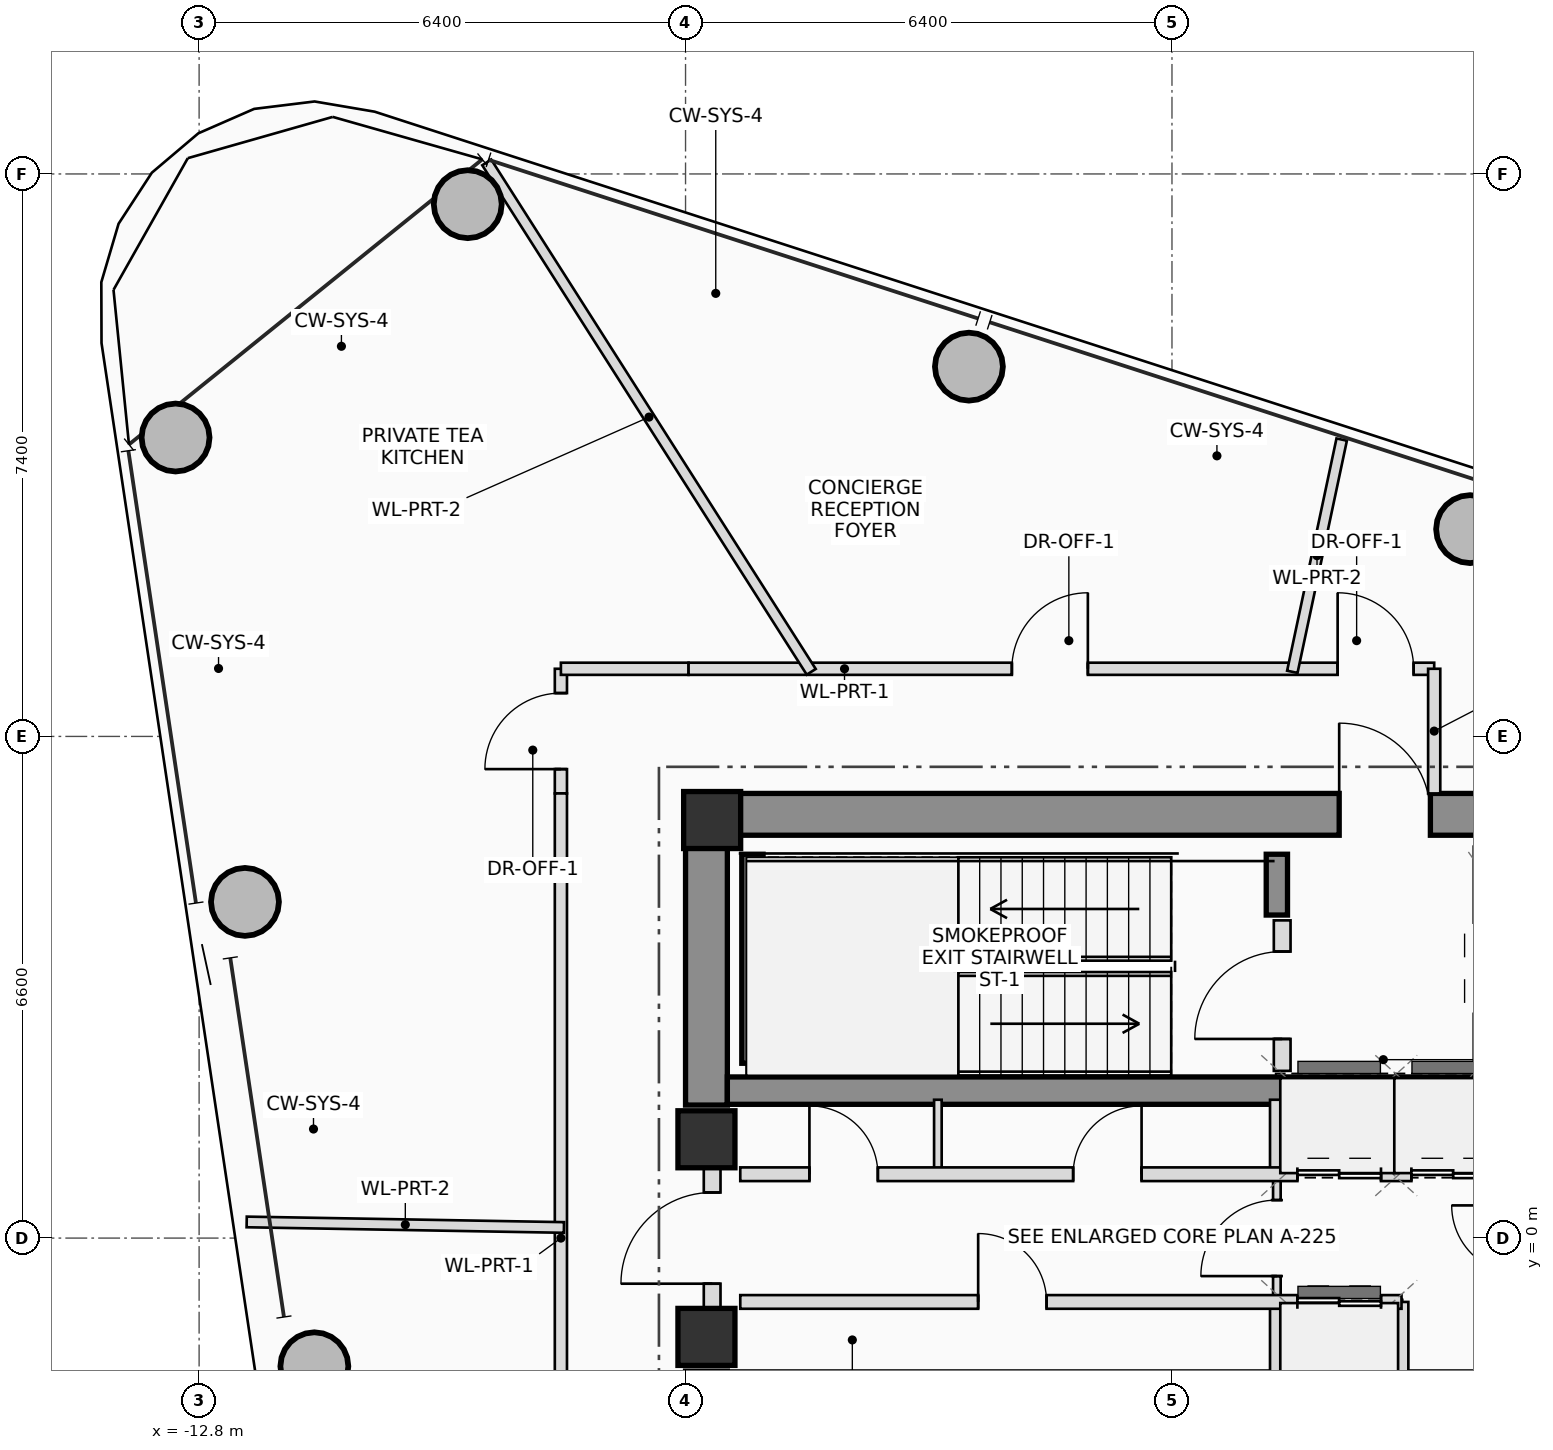
"""IFC4 building model, lengths in metres.
Left out: names, types, materials, properties, quantities, classifications, styles, units other than length and angle.
Written with IfcOpenShell. Run it as: python <this file> out.ifc"""

import sys

from ifc_helpers import new_model, si_unit, direction, frame, frame_2d, origin, origin_2d, place, context, subcontext, project, spatial, rectangle, hollow_circle, extrude, source, transform, mapped, element, fill, save


model = new_model("IFC4")
c1 = context("Model", 3, precision=1e-05, world=origin(), true_north=direction((0.0, 1.0)))
c2 = subcontext(c1, "Body", "Model", "MODEL_VIEW")
j1 = project(units=[si_unit("LENGTHUNIT", "METRE"), si_unit("PLANEANGLEUNIT", "RADIAN")], contexts=[c1])
p1 = place(None, origin())
s1 = spatial("IfcSite", under=j1, at=p1, CompositionType="ELEMENT")
p2 = place(p1, origin())
s2 = spatial("IfcBuilding", under=s1, at=p2, CompositionType="ELEMENT")
p3 = place(p2, frame((0.0, 0.0, 277.95)))
s3 = spatial("IfcBuildingStorey", under=s2, at=p3, CompositionType="ELEMENT", Elevation=277.95)
m1 = source(origin(), c2, "Body", "SweptSolid", [
    extrude(rectangle(XDim=0.75, YDim=0.75, at=origin_2d()), origin(), (0.0, 0.0, 1.0), 3.4),
])
p4 = place(p3, frame((-6.05, 5.5, 0.0), z_axis=(0.0, 0.0, 1.0), x_axis=(1.0, 0.0, 0.0)))
e1 = element("IfcColumn", 1, at=p4, inside=s3, PredefinedType="COLUMN", context=c2, shape_type="MappedRepresentation", body=[
    mapped(m1, transform((0.0, 0.0, 0.0), scale=1.0)),
])
p5 = place(p3, frame((-6.4, 5.575, 0.0), z_axis=(0.0, 0.0, 1.0), x_axis=(1.0, 0.0, 0.0)))
e2 = element("IfcWall", 2, at=p5, inside=s3, PredefinedType="SHEAR", context=c2, shape_type="SweptSolid", body=[
    extrude(rectangle(XDim=12.8, YDim=0.55, at=frame_2d((6.4, 0.0))), origin(), (0.0, 0.0, 1.0), 3.4),
])
p6 = place(p5, frame((8.6, 0.0, 0.0)))
e3 = element("IfcOpeningElement", 3, at=p6, cuts=e2, PredefinedType="OPENING", context=c2, shape_type="SweptSolid", body=[
    extrude(rectangle(XDim=1.2, YDim=2.2, at=frame_2d((0.6, 1.1))), frame((0.0, 0.285, 0.0), z_axis=(0.0, -1.0, 0.0), x_axis=(1.0, 0.0, 0.0)), (0.0, 0.0, 1.0), 0.57),
])
p7 = place(p3, frame((-6.125, 1.75, 0.0), z_axis=(0.0, 0.0, 1.0), x_axis=(0.0, 1.0, 0.0)))
e4 = element("IfcWall", 4, at=p7, inside=s3, PredefinedType="SHEAR", context=c2, shape_type="SweptSolid", body=[
    extrude(rectangle(XDim=3.55, YDim=0.55, at=frame_2d((1.775, 0.0))), origin(), (0.0, 0.0, 1.0), 3.4),
])
p8 = place(p3, frame((-5.85, 1.94, 0.0), z_axis=(0.0, 0.0, 1.0), x_axis=(1.0, 0.0, 0.0)))
e5 = element("IfcWall", 5, at=p8, inside=s3, PredefinedType="SHEAR", context=c2, shape_type="SweptSolid", body=[
    extrude(rectangle(XDim=11.7, YDim=0.36, at=frame_2d((5.85, 0.0))), origin(), (0.0, 0.0, 1.0), 3.4),
])
p9 = place(p3, frame((-5.52, 2.3, 0.0), z_axis=(0.0, 0.0, 1.0), x_axis=(0.0, 1.0, 0.0)))
e6 = element("IfcWall", 6, at=p9, inside=s3, PredefinedType="SHEAR", context=c2, shape_type="SweptSolid", body=[
    extrude(rectangle(XDim=2.75, YDim=0.28, at=frame_2d((1.375, 0.0))), origin(), (0.0, 0.0, 1.0), 3.4),
])
p10 = place(p3, frame((1.38, 4.25, 0.0), z_axis=(0.0, 0.0, 1.0), x_axis=(0.0, 1.0, 0.0)))
e7 = element("IfcWall", 7, at=p10, inside=s3, PredefinedType="SHEAR", context=c2, shape_type="SweptSolid", body=[
    extrude(rectangle(XDim=0.8, YDim=0.28, at=frame_2d((0.4, 0.0))), origin(), (0.0, 0.0, 1.0), 3.4),
])
for number, where, z_axis, x_axis in (
    (8, (-6.125, -1.3, 0.0), (0.0, 0.0, 1.0), (1.0, 0.0, 0.0)),
    (9, (-6.125, 1.3, 0.0), (0.0, 0.0, 1.0), (1.0, 0.0, 0.0)),
):
    element("IfcColumn", number, at=place(p3, frame(where, z_axis=z_axis, x_axis=x_axis)), inside=s3, PredefinedType="COLUMN", context=c2, shape_type="MappedRepresentation", body=[
        mapped(m1, transform((0.0, 0.0, 0.0), scale=1.0)),
    ])
m2 = source(origin(), c2, "Body", "SweptSolid", [
    extrude(hollow_circle(Radius=0.45, WallThickness=0.032, at=origin_2d()), origin(), (0.0, 0.0, 1.0), 3.4),
])
for number, where, z_axis, x_axis in (
    (10, (3.922, 9.327, 0.0), (0.0, 0.0, 1.0), (1.0, 0.0, 0.0)),
    (11, (-2.672, 11.465, 0.0), (0.0, 0.0, 1.0), (1.0, 0.0, 0.0)),
    (12, (-9.266, 13.602, 0.0), (0.0, 0.0, 1.0), (1.0, 0.0, 0.0)),
    (13, (-13.11, 10.532, 0.0), (0.0, 0.0, 1.0), (1.0, 0.0, 0.0)),
    (14, (-12.197, 4.423, 0.0), (0.0, 0.0, 1.0), (1.0, 0.0, 0.0)),
    (15, (-11.284, -1.686, 0.0), (0.0, 0.0, 1.0), (1.0, 0.0, 0.0)),
):
    element("IfcColumn", number, at=place(p3, frame(where, z_axis=z_axis, x_axis=x_axis)), inside=s3, PredefinedType="COLUMN", context=c2, shape_type="MappedRepresentation", body=[
        mapped(m2, transform((0.0, 0.0, 0.0), scale=1.0)),
    ])
p11 = place(p3, frame((-6.05, -0.95, 0.0), z_axis=(0.0, 0.0, 1.0), x_axis=(0.0, 1.0, 0.0)))
e16 = element("IfcWall", 16, at=p11, inside=s3, PredefinedType="PLUMBINGWALL", context=c2, shape_type="SweptSolid", body=[
    extrude(rectangle(XDim=1.9, YDim=0.22, at=frame_2d((0.95, 0.0))), origin(), (0.0, 0.0, 1.0), 2.18),
])
p12 = place(p11, frame((0.35, 0.0, 0.0)))
e17 = element("IfcOpeningElement", 17, at=p12, cuts=e16, PredefinedType="OPENING", context=c2, shape_type="SweptSolid", body=[
    extrude(rectangle(XDim=1.2, YDim=2.2, at=frame_2d((0.6, 1.1))), frame((0.0, 0.12, 0.0), z_axis=(0.0, -1.0, 0.0), x_axis=(1.0, 0.0, 0.0)), (0.0, 0.0, 1.0), 0.24),
])
p13 = place(p3, frame((1.45, 2.2, 0.0), z_axis=(0.0, 0.0, 1.0), x_axis=(0.0, 1.0, 0.0)))
e18 = element("IfcWall", 18, at=p13, inside=s3, PredefinedType="PLUMBINGWALL", context=c2, shape_type="SweptSolid", body=[
    extrude(rectangle(XDim=1.98, YDim=0.22, at=frame_2d((0.99, 0.0))), origin(), (0.0, 0.0, 1.0), 3.2),
])
p14 = place(p13, frame((0.42, 0.0, 0.0)))
e19 = element("IfcOpeningElement", 19, at=p14, cuts=e18, PredefinedType="OPENING", context=c2, shape_type="SweptSolid", body=[
    extrude(rectangle(XDim=1.15, YDim=2.15, at=frame_2d((0.575, 1.075))), frame((0.0, 0.12, 0.0), z_axis=(0.0, -1.0, 0.0), x_axis=(1.0, 0.0, 0.0)), (0.0, 0.0, 1.0), 0.24),
])
p15 = place(p3, frame((1.38, -0.84, 0.0), z_axis=(0.0, 0.0, 1.0), x_axis=(0.0, 1.0, 0.0)))
e20 = element("IfcWall", 20, at=p15, inside=s3, PredefinedType="PARTITIONING", context=c2, shape_type="SweptSolid", body=[
    extrude(rectangle(XDim=1.68, YDim=0.1, at=frame_2d((0.84, 0.0))), origin(), (0.0, 0.0, 1.0), 3.2),
])
p16 = place(p15, frame((0.34, 0.0, 0.0)))
e21 = element("IfcOpeningElement", 21, at=p16, cuts=e20, PredefinedType="OPENING", context=c2, shape_type="SweptSolid", body=[
    extrude(rectangle(XDim=1.0, YDim=2.25, at=frame_2d((0.5, 1.125))), frame((0.0, 0.06, 0.0), z_axis=(0.0, -1.0, 0.0), x_axis=(1.0, 0.0, 0.0)), (0.0, 0.0, 1.0), 0.12),
])
p17 = place(p3, frame((-3.08, 0.84, 0.0), z_axis=(0.0, 0.0, 1.0), x_axis=(0.0, 1.0, 0.0)))
e22 = element("IfcWall", 22, at=p17, inside=s3, PredefinedType="PARTITIONING", context=c2, shape_type="SweptSolid", body=[
    extrude(rectangle(XDim=0.98, YDim=0.1, at=frame_2d((0.49, 0.0))), origin(), (0.0, 0.0, 1.0), 3.2),
])
for number, where, z_axis, x_axis in (
    (23, (1.38, 0.84, 0.0), (0.0, 0.0, 1.0), (0.0, 1.0, 0.0)),
    (24, (1.38, -1.82, 0.0), (0.0, 0.0, 1.0), (0.0, 1.0, 0.0)),
    (25, (3.02, 0.84, 0.0), (0.0, 0.0, 1.0), (0.0, 1.0, 0.0)),
    (26, (3.02, -1.82, 0.0), (0.0, 0.0, 1.0), (0.0, 1.0, 0.0)),
):
    element("IfcWall", number, at=place(p3, frame(where, z_axis=z_axis, x_axis=x_axis)), inside=s3, PredefinedType="PLUMBINGWALL", context=c2, shape_type="SweptSolid", body=[
        extrude(rectangle(XDim=0.98, YDim=0.18, at=frame_2d((0.49, 0.0))), origin(), (0.0, 0.0, 1.0), 3.2),
    ])
p18 = place(p3, frame((-5.68, 0.84, 0.0), z_axis=(0.0, 0.0, 1.0), x_axis=(1.0, 0.0, 0.0)))
e27 = element("IfcWall", 27, at=p18, inside=s3, PredefinedType="PLUMBINGWALL", context=c2, shape_type="SweptSolid", body=[
    extrude(rectangle(XDim=10.26, YDim=0.18, at=frame_2d((5.13, 0.0))), origin(), (0.0, 0.0, 1.0), 3.2),
])
p19 = place(p18, frame((0.91, 0.0, 0.0)))
e28 = element("IfcOpeningElement", 28, at=p19, cuts=e27, PredefinedType="OPENING", context=c2, shape_type="SweptSolid", body=[
    extrude(rectangle(XDim=0.9, YDim=2.05, at=frame_2d((0.45, 1.025))), frame((0.0, 0.1, 0.0), z_axis=(0.0, -1.0, 0.0), x_axis=(1.0, 0.0, 0.0)), (0.0, 0.0, 1.0), 0.2),
])
p20 = place(p18, frame((4.38, 0.0, 0.0)))
e29 = element("IfcOpeningElement", 29, at=p20, cuts=e27, PredefinedType="OPENING", context=c2, shape_type="SweptSolid", body=[
    extrude(rectangle(XDim=0.9, YDim=2.05, at=frame_2d((0.45, 1.025))), frame((0.0, 0.1, 0.0), z_axis=(0.0, -1.0, 0.0), x_axis=(1.0, 0.0, 0.0)), (0.0, 0.0, 1.0), 0.2),
])
p21 = place(p18, frame((7.33, 0.0, 0.0)))
e30 = element("IfcOpeningElement", 30, at=p21, cuts=e27, PredefinedType="OPENING", context=c2, shape_type="SweptSolid", body=[
    extrude(rectangle(XDim=1.1, YDim=2.2, at=frame_2d((0.55, 1.1))), frame((0.0, 0.1, 0.0), z_axis=(0.0, -1.0, 0.0), x_axis=(1.0, 0.0, 0.0)), (0.0, 0.0, 1.0), 0.2),
])
p22 = place(p18, frame((8.83, 0.0, 0.0)))
e31 = element("IfcOpeningElement", 31, at=p22, cuts=e27, PredefinedType="OPENING", context=c2, shape_type="SweptSolid", body=[
    extrude(rectangle(XDim=1.1, YDim=2.2, at=frame_2d((0.55, 1.1))), frame((0.0, 0.1, 0.0), z_axis=(0.0, -1.0, 0.0), x_axis=(1.0, 0.0, 0.0)), (0.0, 0.0, 1.0), 0.2),
])
p23 = place(p3, frame((-5.68, -0.84, 0.0), z_axis=(0.0, 0.0, 1.0), x_axis=(1.0, 0.0, 0.0)))
e32 = element("IfcWall", 32, at=p23, inside=s3, PredefinedType="PLUMBINGWALL", context=c2, shape_type="SweptSolid", body=[
    extrude(rectangle(XDim=8.7, YDim=0.18, at=frame_2d((4.35, 0.0))), origin(), (0.0, 0.0, 1.0), 3.2),
])
p24 = place(p23, frame((3.13, 0.0, 0.0)))
e33 = element("IfcOpeningElement", 33, at=p24, cuts=e32, PredefinedType="OPENING", context=c2, shape_type="SweptSolid", body=[
    extrude(rectangle(XDim=0.9, YDim=2.05, at=frame_2d((0.45, 1.025))), frame((0.0, 0.1, 0.0), z_axis=(0.0, -1.0, 0.0), x_axis=(1.0, 0.0, 0.0)), (0.0, 0.0, 1.0), 0.2),
])
p25 = place(p23, frame((7.33, 0.0, 0.0)))
e34 = element("IfcOpeningElement", 34, at=p25, cuts=e32, PredefinedType="OPENING", context=c2, shape_type="SweptSolid", body=[
    extrude(rectangle(XDim=1.1, YDim=2.2, at=frame_2d((0.55, 1.1))), frame((0.0, 0.1, 0.0), z_axis=(0.0, -1.0, 0.0), x_axis=(1.0, 0.0, 0.0)), (0.0, 0.0, 1.0), 0.2),
])
p26 = place(p3, frame((-8.04, 5.85, 0.0), z_axis=(0.0, 0.0, 1.0), x_axis=(0.0, 1.0, 0.0)))
e35 = element("IfcWall", 35, at=p26, inside=s3, PredefinedType="PARTITIONING", context=c2, shape_type="SweptSolid", body=[
    extrude(rectangle(XDim=1.64, YDim=0.16, at=frame_2d((0.82, 0.0))), origin(), (0.0, 0.0, 1.0), 2.605),
])
p27 = place(p26, frame((0.32, 0.0, 0.0)))
e36 = element("IfcOpeningElement", 36, at=p27, cuts=e35, PredefinedType="OPENING", context=c2, shape_type="SweptSolid", body=[
    extrude(rectangle(XDim=1.0, YDim=2.25, at=frame_2d((0.5, 1.125))), frame((0.0, 0.09, 0.0), z_axis=(0.0, -1.0, 0.0), x_axis=(1.0, 0.0, 0.0)), (0.0, 0.0, 1.0), 0.18),
])
p28 = place(p3, frame((-8.04, 7.49, 0.0), z_axis=(0.0, 0.0, 1.0), x_axis=(1.0, 0.0, 0.0)))
e37 = element("IfcWall", 37, at=p28, inside=s3, PredefinedType="PARTITIONING", context=c2, shape_type="SweptSolid", body=[
    extrude(rectangle(XDim=1.68, YDim=0.16, at=frame_2d((0.84, 0.0))), origin(), (0.0, 0.0, 1.0), 2.605),
])
p29 = place(p3, frame((-6.36, 7.49, 0.0), z_axis=(0.0, 0.0, 1.0), x_axis=(1.0, 0.0, 0.0)))
e38 = element("IfcWall", 38, at=p29, inside=s3, PredefinedType="PARTITIONING", context=c2, shape_type="SweptSolid", body=[
    extrude(rectangle(XDim=9.81, YDim=0.16, at=frame_2d((4.905, 0.0))), origin(), (0.0, 0.0, 1.0), 2.605),
])
p30 = place(p29, frame((4.253, 0.0, 0.0)))
e39 = element("IfcOpeningElement", 39, at=p30, cuts=e38, PredefinedType="OPENING", context=c2, shape_type="SweptSolid", body=[
    extrude(rectangle(XDim=1.0, YDim=2.25, at=frame_2d((0.5, 1.125))), frame((0.0, 0.09, 0.0), z_axis=(0.0, -1.0, 0.0), x_axis=(1.0, 0.0, 0.0)), (0.0, 0.0, 1.0), 0.18),
])
p31 = place(p29, frame((8.54, 0.0, 0.0)))
e40 = element("IfcOpeningElement", 40, at=p31, cuts=e38, PredefinedType="OPENING", context=c2, shape_type="SweptSolid", body=[
    extrude(rectangle(XDim=1.0, YDim=2.25, at=frame_2d((0.5, 1.125))), frame((0.0, 0.09, 0.0), z_axis=(0.0, -1.0, 0.0), x_axis=(1.0, 0.0, 0.0)), (0.0, 0.0, 1.0), 0.18),
])
p32 = place(p3, frame((3.45, 7.49, 0.0), z_axis=(0.0, 0.0, 1.0), x_axis=(0.0, -1.0, 0.0)))
e41 = element("IfcWall", 41, at=p32, inside=s3, PredefinedType="PARTITIONING", context=c2, shape_type="SweptSolid", body=[
    extrude(rectangle(XDim=1.64, YDim=0.16, at=frame_2d((0.82, 0.0))), origin(), (0.0, 0.0, 1.0), 2.805),
])
p33 = place(p3, frame((-8.04, -5.85, 0.0), z_axis=(0.0, 0.0, 1.0), x_axis=(0.0, 1.0, 0.0)))
e42 = element("IfcWall", 42, at=p33, inside=s3, PredefinedType="PARTITIONING", context=c2, shape_type="SweptSolid", body=[
    extrude(rectangle(XDim=11.7, YDim=0.16, at=frame_2d((5.85, 0.0))), origin(), (0.0, 0.0, 1.0), 2.605),
])
p34 = place(p3, frame((1.583, 7.45, 0.0), z_axis=(0.0, 0.0, 1.0), x_axis=(0.20788492722, 0.978153289129, 0.0)))
e43 = element("IfcWall", 43, at=p34, inside=s3, PredefinedType="PARTITIONING", context=c2, shape_type="SweptSolid", body=[
    extrude(rectangle(XDim=3.124, YDim=0.14, at=frame_2d((1.562, 0.0))), origin(), (0.0, 0.0, 1.0), 2.765),
])
p35 = place(p3, frame((-4.746, 7.45, 0.0), z_axis=(0.0, 0.0, 1.0), x_axis=(-0.537302825122, 0.843389396492, 0.0)))
e44 = element("IfcWall", 44, at=p35, inside=s3, PredefinedType="PARTITIONING", context=c2, shape_type="SweptSolid", body=[
    extrude(rectangle(XDim=7.947, YDim=0.14, at=frame_2d((3.973, 0.0))), origin(), (0.0, 0.0, 1.0), 2.605),
])
p36 = place(p3, frame((-8.0, 0.14, 0.0), z_axis=(0.0, 0.0, 1.0), x_axis=(-0.999848132876, 0.017427311435, 0.0)))
e45 = element("IfcWall", 45, at=p36, inside=s3, PredefinedType="PARTITIONING", context=c2, shape_type="SweptSolid", body=[
    extrude(rectangle(XDim=4.175, YDim=0.14, at=frame_2d((2.087, 0.0))), origin(), (0.0, 0.0, 1.0), 2.765),
])
p37 = place(p6, origin())
e46 = element("IfcDoor", 46, at=p37, inside=s3, OperationType="SINGLE_SWING_LEFT", PredefinedType="DOOR", context=c2, shape_type="SweptSolid", body=[
    extrude(rectangle(XDim=1.2, YDim=2.2, at=frame_2d((0.6, 1.1))), frame((0.0, 0.025, 0.0), z_axis=(0.0, -1.0, 0.0), x_axis=(1.0, 0.0, 0.0)), (0.0, 0.0, 1.0), 0.05),
])
fill(e3, e46)
p38 = place(p12, origin())
e47 = element("IfcDoor", 47, at=p38, inside=s3, OperationType="SINGLE_SWING_LEFT", PredefinedType="DOOR", context=c2, shape_type="SweptSolid", body=[
    extrude(rectangle(XDim=1.2, YDim=2.2, at=frame_2d((0.6, 1.1))), frame((0.0, 0.025, 0.0), z_axis=(0.0, -1.0, 0.0), x_axis=(1.0, 0.0, 0.0)), (0.0, 0.0, 1.0), 0.05),
])
fill(e17, e47)
p39 = place(p14, origin())
e48 = element("IfcDoor", 48, at=p39, inside=s3, OperationType="SINGLE_SWING_LEFT", PredefinedType="DOOR", context=c2, shape_type="SweptSolid", body=[
    extrude(rectangle(XDim=1.15, YDim=2.15, at=frame_2d((0.575, 1.075))), frame((0.0, 0.025, 0.0), z_axis=(0.0, -1.0, 0.0), x_axis=(1.0, 0.0, 0.0)), (0.0, 0.0, 1.0), 0.05),
])
fill(e19, e48)
p40 = place(p16, origin())
e49 = element("IfcDoor", 49, at=p40, inside=s3, OperationType="SINGLE_SWING_LEFT", PredefinedType="DOOR", context=c2, shape_type="SweptSolid", body=[
    extrude(rectangle(XDim=1.0, YDim=2.25, at=frame_2d((0.5, 1.125))), frame((0.0, 0.025, 0.0), z_axis=(0.0, -1.0, 0.0), x_axis=(1.0, 0.0, 0.0)), (0.0, 0.0, 1.0), 0.05),
])
fill(e21, e49)
p41 = place(p19, origin())
e50 = element("IfcDoor", 50, at=p41, inside=s3, OperationType="SINGLE_SWING_LEFT", PredefinedType="DOOR", context=c2, shape_type="SweptSolid", body=[
    extrude(rectangle(XDim=0.9, YDim=2.05, at=frame_2d((0.45, 1.025))), frame((0.0, 0.025, 0.0), z_axis=(0.0, -1.0, 0.0), x_axis=(1.0, 0.0, 0.0)), (0.0, 0.0, 1.0), 0.05),
])
fill(e28, e50)
p42 = place(p20, origin())
e51 = element("IfcDoor", 51, at=p42, inside=s3, OperationType="SINGLE_SWING_RIGHT", PredefinedType="DOOR", context=c2, shape_type="SweptSolid", body=[
    extrude(rectangle(XDim=0.9, YDim=2.05, at=frame_2d((0.45, 1.025))), frame((0.0, 0.025, 0.0), z_axis=(0.0, -1.0, 0.0), x_axis=(1.0, 0.0, 0.0)), (0.0, 0.0, 1.0), 0.05),
])
fill(e29, e51)
p43 = place(p21, origin())
e52 = element("IfcDoor", 52, at=p43, inside=s3, OperationType="DOUBLE_DOOR_SLIDING", PredefinedType="DOOR", context=c2, shape_type="SweptSolid", body=[
    extrude(rectangle(XDim=1.1, YDim=2.2, at=frame_2d((0.55, 1.1))), frame((0.0, 0.025, 0.0), z_axis=(0.0, -1.0, 0.0), x_axis=(1.0, 0.0, 0.0)), (0.0, 0.0, 1.0), 0.05),
])
fill(e30, e52)
p44 = place(p22, origin())
e53 = element("IfcDoor", 53, at=p44, inside=s3, OperationType="DOUBLE_DOOR_SLIDING", PredefinedType="DOOR", context=c2, shape_type="SweptSolid", body=[
    extrude(rectangle(XDim=1.1, YDim=2.2, at=frame_2d((0.55, 1.1))), frame((0.0, 0.025, 0.0), z_axis=(0.0, -1.0, 0.0), x_axis=(1.0, 0.0, 0.0)), (0.0, 0.0, 1.0), 0.05),
])
fill(e31, e53)
p45 = place(p24, origin())
e54 = element("IfcDoor", 54, at=p45, inside=s3, OperationType="SINGLE_SWING_LEFT", PredefinedType="DOOR", context=c2, shape_type="SweptSolid", body=[
    extrude(rectangle(XDim=0.9, YDim=2.05, at=frame_2d((0.45, 1.025))), frame((0.0, 0.025, 0.0), z_axis=(0.0, -1.0, 0.0), x_axis=(1.0, 0.0, 0.0)), (0.0, 0.0, 1.0), 0.05),
])
fill(e33, e54)
p46 = place(p25, origin())
e55 = element("IfcDoor", 55, at=p46, inside=s3, OperationType="DOUBLE_DOOR_SLIDING", PredefinedType="DOOR", context=c2, shape_type="SweptSolid", body=[
    extrude(rectangle(XDim=1.1, YDim=2.2, at=frame_2d((0.55, 1.1))), frame((0.0, 0.025, 0.0), z_axis=(0.0, -1.0, 0.0), x_axis=(1.0, 0.0, 0.0)), (0.0, 0.0, 1.0), 0.05),
])
fill(e34, e55)
p47 = place(p27, origin())
e56 = element("IfcDoor", 56, at=p47, inside=s3, OperationType="SINGLE_SWING_LEFT", PredefinedType="DOOR", context=c2, shape_type="SweptSolid", body=[
    extrude(rectangle(XDim=1.0, YDim=2.25, at=frame_2d((0.5, 1.125))), frame((0.0, 0.025, 0.0), z_axis=(0.0, -1.0, 0.0), x_axis=(1.0, 0.0, 0.0)), (0.0, 0.0, 1.0), 0.05),
])
fill(e36, e56)
p48 = place(p30, origin())
e57 = element("IfcDoor", 57, at=p48, inside=s3, OperationType="SINGLE_SWING_RIGHT", PredefinedType="DOOR", context=c2, shape_type="SweptSolid", body=[
    extrude(rectangle(XDim=1.0, YDim=2.25, at=frame_2d((0.5, 1.125))), frame((0.0, 0.025, 0.0), z_axis=(0.0, -1.0, 0.0), x_axis=(1.0, 0.0, 0.0)), (0.0, 0.0, 1.0), 0.05),
])
fill(e39, e57)
p49 = place(p31, origin())
e58 = element("IfcDoor", 58, at=p49, inside=s3, OperationType="SINGLE_SWING_LEFT", PredefinedType="DOOR", context=c2, shape_type="SweptSolid", body=[
    extrude(rectangle(XDim=1.0, YDim=2.25, at=frame_2d((0.5, 1.125))), frame((0.0, 0.025, 0.0), z_axis=(0.0, -1.0, 0.0), x_axis=(1.0, 0.0, 0.0)), (0.0, 0.0, 1.0), 0.05),
])
fill(e40, e58)
save(model, sys.argv[1])
